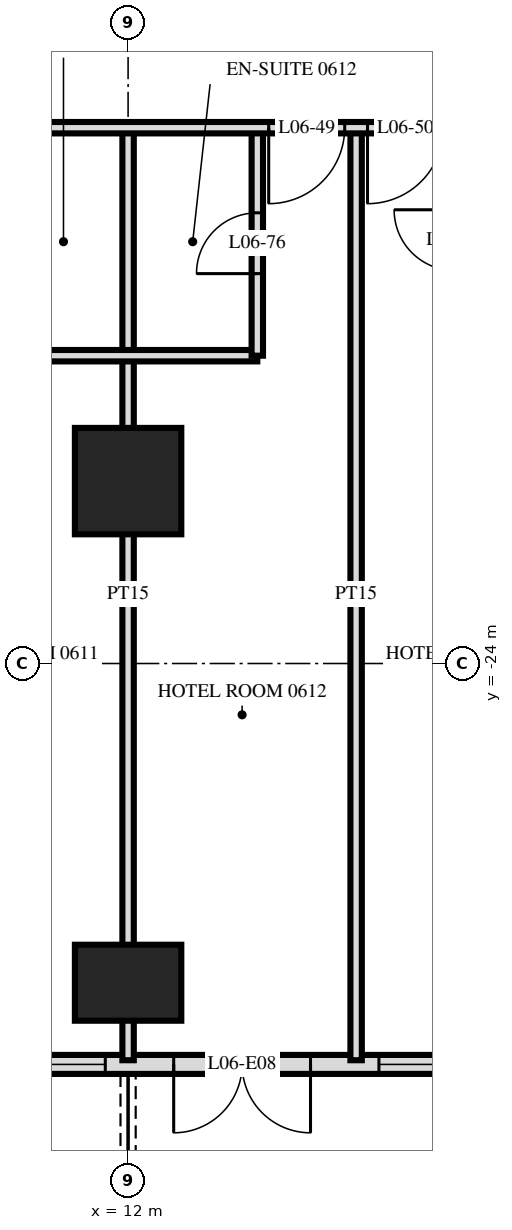
"""IFC4 building model, lengths in metres.
Left out: names, types, materials, properties, quantities, classifications, styles, units other than length and angle.
Written with IfcOpenShell. Run it as: python <this file> out.ifc"""

import sys

from ifc_helpers import new_model, si_unit, direction, frame, frame_2d, origin, origin_2d, place, context, subcontext, project, spatial, rectangle, extrude, element, fill, save


model = new_model("IFC4")
c1 = context("Model", 3, precision=1e-05, world=origin(), true_north=direction((0.0, 1.0)))
c2 = subcontext(c1, "Body", "Model", "MODEL_VIEW")
j1 = project(units=[si_unit("LENGTHUNIT", "METRE"), si_unit("PLANEANGLEUNIT", "RADIAN")], contexts=[c1])
p1 = place(None, origin())
s1 = spatial("IfcSite", under=j1, at=p1, CompositionType="ELEMENT")
p2 = place(p1, origin())
s2 = spatial("IfcBuilding", under=s1, at=p2, CompositionType="ELEMENT")
p3 = place(p2, frame((0.0, 0.0, 31.2)))
s3 = spatial("IfcBuildingStorey", under=s2, at=p3, CompositionType="ELEMENT", Elevation=31.2)
p4 = place(p3, frame((12.0, -28.2, 0.0), z_axis=(0.0, 0.0, 1.0), x_axis=(1.0, 0.0, 0.0)))
e1 = element("IfcColumn", 1, at=p4, inside=s3, PredefinedType="COLUMN", context=c2, shape_type="SweptSolid", body=[
    extrude(rectangle(XDim=1.4, YDim=1.0, at=origin_2d()), origin(), (0.0, 0.0, 1.0), 3.6),
])
p5 = place(p3, frame((12.0, -21.6, 0.0), z_axis=(0.0, 0.0, 1.0), x_axis=(1.0, 0.0, 0.0)))
e2 = element("IfcColumn", 2, at=p5, inside=s3, PredefinedType="COLUMN", context=c2, shape_type="SweptSolid", body=[
    extrude(rectangle(XDim=1.4, YDim=1.4, at=origin_2d()), origin(), (0.0, 0.0, 1.0), 3.6),
])
p6 = place(p3, frame((-28.775, -29.275, 0.0), z_axis=(0.0, 0.0, 1.0), x_axis=(1.0, 0.0, 0.0)))
e3 = element("IfcWall", 3, at=p6, inside=s3, PredefinedType="SOLIDWALL", context=c2, shape_type="SweptSolid", body=[
    extrude(rectangle(XDim=57.551, YDim=0.25, at=frame_2d((28.775, 0.0))), origin(), (0.0, 0.0, 1.0), 3.32),
])
p7 = place(p6, frame((0.575, 0.0, 0.0)))
e4 = element("IfcOpeningElement", 4, at=p7, cuts=e3, PredefinedType="OPENING", context=c2, shape_type="SweptSolid", body=[
    extrude(rectangle(XDim=1.8, YDim=2.4, at=frame_2d((0.9, 1.2))), frame((0.0, 0.135, 0.0), z_axis=(0.0, -1.0, 0.0), x_axis=(1.0, 0.0, 0.0)), (0.0, 0.0, 1.0), 0.27),
])
p8 = place(p6, frame((5.375, 0.0, 0.0)))
e5 = element("IfcOpeningElement", 5, at=p8, cuts=e3, PredefinedType="OPENING", context=c2, shape_type="SweptSolid", body=[
    extrude(rectangle(XDim=1.8, YDim=2.4, at=frame_2d((0.9, 1.2))), frame((0.0, 0.135, 0.0), z_axis=(0.0, -1.0, 0.0), x_axis=(1.0, 0.0, 0.0)), (0.0, 0.0, 1.0), 0.27),
])
p9 = place(p6, frame((8.075, 0.0, 0.3)))
e6 = element("IfcOpeningElement", 6, at=p9, cuts=e3, PredefinedType="OPENING", context=c2, shape_type="SweptSolid", body=[
    extrude(rectangle(XDim=2.4, YDim=2.1, at=frame_2d((1.2, 1.05))), frame((0.0, 0.135, 0.0), z_axis=(0.0, -1.0, 0.0), x_axis=(1.0, 0.0, 0.0)), (0.0, 0.0, 1.0), 0.27),
])
p10 = place(p6, frame((11.375, 0.0, 0.0)))
e7 = element("IfcOpeningElement", 7, at=p10, cuts=e3, PredefinedType="OPENING", context=c2, shape_type="SweptSolid", body=[
    extrude(rectangle(XDim=1.8, YDim=2.4, at=frame_2d((0.9, 1.2))), frame((0.0, 0.135, 0.0), z_axis=(0.0, -1.0, 0.0), x_axis=(1.0, 0.0, 0.0)), (0.0, 0.0, 1.0), 0.27),
])
p11 = place(p6, frame((14.075, 0.0, 0.3)))
e8 = element("IfcOpeningElement", 8, at=p11, cuts=e3, PredefinedType="OPENING", context=c2, shape_type="SweptSolid", body=[
    extrude(rectangle(XDim=2.4, YDim=2.1, at=frame_2d((1.2, 1.05))), frame((0.0, 0.135, 0.0), z_axis=(0.0, -1.0, 0.0), x_axis=(1.0, 0.0, 0.0)), (0.0, 0.0, 1.0), 0.27),
])
p12 = place(p6, frame((17.375, 0.0, 0.0)))
e9 = element("IfcOpeningElement", 9, at=p12, cuts=e3, PredefinedType="OPENING", context=c2, shape_type="SweptSolid", body=[
    extrude(rectangle(XDim=1.8, YDim=2.4, at=frame_2d((0.9, 1.2))), frame((0.0, 0.135, 0.0), z_axis=(0.0, -1.0, 0.0), x_axis=(1.0, 0.0, 0.0)), (0.0, 0.0, 1.0), 0.27),
])
p13 = place(p6, frame((20.075, 0.0, 0.3)))
e10 = element("IfcOpeningElement", 10, at=p13, cuts=e3, PredefinedType="OPENING", context=c2, shape_type="SweptSolid", body=[
    extrude(rectangle(XDim=2.4, YDim=2.1, at=frame_2d((1.2, 1.05))), frame((0.0, 0.135, 0.0), z_axis=(0.0, -1.0, 0.0), x_axis=(1.0, 0.0, 0.0)), (0.0, 0.0, 1.0), 0.27),
])
p14 = place(p6, frame((23.075, 0.0, 0.3)))
e11 = element("IfcOpeningElement", 11, at=p14, cuts=e3, PredefinedType="OPENING", context=c2, shape_type="SweptSolid", body=[
    extrude(rectangle(XDim=2.4, YDim=2.1, at=frame_2d((1.2, 1.05))), frame((0.0, 0.135, 0.0), z_axis=(0.0, -1.0, 0.0), x_axis=(1.0, 0.0, 0.0)), (0.0, 0.0, 1.0), 0.27),
])
p15 = place(p6, frame((26.375, 0.0, 0.0)))
e12 = element("IfcOpeningElement", 12, at=p15, cuts=e3, PredefinedType="OPENING", context=c2, shape_type="SweptSolid", body=[
    extrude(rectangle(XDim=1.8, YDim=2.4, at=frame_2d((0.9, 1.2))), frame((0.0, 0.135, 0.0), z_axis=(0.0, -1.0, 0.0), x_axis=(1.0, 0.0, 0.0)), (0.0, 0.0, 1.0), 0.27),
])
p16 = place(p6, frame((29.375, 0.0, 0.0)))
e13 = element("IfcOpeningElement", 13, at=p16, cuts=e3, PredefinedType="OPENING", context=c2, shape_type="SweptSolid", body=[
    extrude(rectangle(XDim=1.8, YDim=2.4, at=frame_2d((0.9, 1.2))), frame((0.0, 0.135, 0.0), z_axis=(0.0, -1.0, 0.0), x_axis=(1.0, 0.0, 0.0)), (0.0, 0.0, 1.0), 0.27),
])
p17 = place(p6, frame((32.075, 0.0, 0.3)))
e14 = element("IfcOpeningElement", 14, at=p17, cuts=e3, PredefinedType="OPENING", context=c2, shape_type="SweptSolid", body=[
    extrude(rectangle(XDim=2.4, YDim=2.1, at=frame_2d((1.2, 1.05))), frame((0.0, 0.135, 0.0), z_axis=(0.0, -1.0, 0.0), x_axis=(1.0, 0.0, 0.0)), (0.0, 0.0, 1.0), 0.27),
])
p18 = place(p6, frame((35.375, 0.0, 0.0)))
e15 = element("IfcOpeningElement", 15, at=p18, cuts=e3, PredefinedType="OPENING", context=c2, shape_type="SweptSolid", body=[
    extrude(rectangle(XDim=1.8, YDim=2.4, at=frame_2d((0.9, 1.2))), frame((0.0, 0.135, 0.0), z_axis=(0.0, -1.0, 0.0), x_axis=(1.0, 0.0, 0.0)), (0.0, 0.0, 1.0), 0.27),
])
p19 = place(p6, frame((38.075, 0.0, 0.3)))
e16 = element("IfcOpeningElement", 16, at=p19, cuts=e3, PredefinedType="OPENING", context=c2, shape_type="SweptSolid", body=[
    extrude(rectangle(XDim=2.4, YDim=2.1, at=frame_2d((1.2, 1.05))), frame((0.0, 0.135, 0.0), z_axis=(0.0, -1.0, 0.0), x_axis=(1.0, 0.0, 0.0)), (0.0, 0.0, 1.0), 0.27),
])
p20 = place(p6, frame((41.375, 0.0, 0.0)))
e17 = element("IfcOpeningElement", 17, at=p20, cuts=e3, PredefinedType="OPENING", context=c2, shape_type="SweptSolid", body=[
    extrude(rectangle(XDim=1.8, YDim=2.4, at=frame_2d((0.9, 1.2))), frame((0.0, 0.135, 0.0), z_axis=(0.0, -1.0, 0.0), x_axis=(1.0, 0.0, 0.0)), (0.0, 0.0, 1.0), 0.27),
])
p21 = place(p6, frame((44.075, 0.0, 0.3)))
e18 = element("IfcOpeningElement", 18, at=p21, cuts=e3, PredefinedType="OPENING", context=c2, shape_type="SweptSolid", body=[
    extrude(rectangle(XDim=2.4, YDim=2.1, at=frame_2d((1.2, 1.05))), frame((0.0, 0.135, 0.0), z_axis=(0.0, -1.0, 0.0), x_axis=(1.0, 0.0, 0.0)), (0.0, 0.0, 1.0), 0.27),
])
p22 = place(p6, frame((47.075, 0.0, 0.3)))
e19 = element("IfcOpeningElement", 19, at=p22, cuts=e3, PredefinedType="OPENING", context=c2, shape_type="SweptSolid", body=[
    extrude(rectangle(XDim=2.4, YDim=2.1, at=frame_2d((1.2, 1.05))), frame((0.0, 0.135, 0.0), z_axis=(0.0, -1.0, 0.0), x_axis=(1.0, 0.0, 0.0)), (0.0, 0.0, 1.0), 0.27),
])
p23 = place(p6, frame((50.375, 0.0, 0.0)))
e20 = element("IfcOpeningElement", 20, at=p23, cuts=e3, PredefinedType="OPENING", context=c2, shape_type="SweptSolid", body=[
    extrude(rectangle(XDim=1.8, YDim=2.4, at=frame_2d((0.9, 1.2))), frame((0.0, 0.135, 0.0), z_axis=(0.0, -1.0, 0.0), x_axis=(1.0, 0.0, 0.0)), (0.0, 0.0, 1.0), 0.27),
])
p24 = place(p6, frame((53.375, 0.0, 0.0)))
e21 = element("IfcOpeningElement", 21, at=p24, cuts=e3, PredefinedType="OPENING", context=c2, shape_type="SweptSolid", body=[
    extrude(rectangle(XDim=1.8, YDim=2.4, at=frame_2d((0.9, 1.2))), frame((0.0, 0.135, 0.0), z_axis=(0.0, -1.0, 0.0), x_axis=(1.0, 0.0, 0.0)), (0.0, 0.0, 1.0), 0.27),
])
p25 = place(p3, frame((15.0, -29.22, 0.0), z_axis=(0.0, 0.0, 1.0), x_axis=(0.0, 1.0, 0.0)))
e22 = element("IfcWall", 22, at=p25, inside=s3, PredefinedType="PARTITIONING", context=c2, shape_type="SweptSolid", body=[
    extrude(rectangle(XDim=12.27, YDim=0.15, at=frame_2d((6.135, 0.0))), origin(), (0.0, 0.0, 1.0), 3.32),
])
p26 = place(p3, frame((13.7, -19.95, 0.0), z_axis=(0.0, 0.0, 1.0), x_axis=(0.0, 1.0, 0.0)))
e23 = element("IfcWall", 23, at=p26, inside=s3, PredefinedType="PARTITIONING", context=c2, shape_type="SweptSolid", body=[
    extrude(rectangle(XDim=3.0, YDim=0.15, at=frame_2d((1.5, 0.0))), origin(), (0.0, 0.0, 1.0), 3.32),
])
p27 = place(p26, frame((1.08, 0.0, 0.0)))
e24 = element("IfcOpeningElement", 24, at=p27, cuts=e23, PredefinedType="OPENING", context=c2, shape_type="SweptSolid", body=[
    extrude(rectangle(XDim=0.8, YDim=2.1, at=frame_2d((0.4, 1.05))), frame((0.0, 0.085, 0.0), z_axis=(0.0, -1.0, 0.0), x_axis=(1.0, 0.0, 0.0)), (0.0, 0.0, 1.0), 0.17),
])
p28 = place(p3, frame((12.0, -29.22, 0.0), z_axis=(0.0, 0.0, 1.0), x_axis=(0.0, 1.0, 0.0)))
e25 = element("IfcWall", 25, at=p28, inside=s3, PredefinedType="PARTITIONING", context=c2, shape_type="SweptSolid", body=[
    extrude(rectangle(XDim=12.27, YDim=0.15, at=frame_2d((6.135, 0.0))), origin(), (0.0, 0.0, 1.0), 3.32),
])
p29 = place(p3, frame((10.3, -19.95, 0.0), z_axis=(0.0, 0.0, 1.0), x_axis=(1.0, 0.0, 0.0)))
e26 = element("IfcWall", 26, at=p29, inside=s3, PredefinedType="PARTITIONING", context=c2, shape_type="SweptSolid", body=[
    extrude(rectangle(XDim=3.4, YDim=0.15, at=frame_2d((1.7, 0.0))), origin(), (0.0, 0.0, 1.0), 3.32),
])
p30 = place(p3, frame((-33.12, -16.95, 0.0), z_axis=(0.0, 0.0, 1.0), x_axis=(1.0, 0.0, 0.0)))
e27 = element("IfcWall", 27, at=p30, inside=s3, PredefinedType="PARTITIONING", context=c2, shape_type="SweptSolid", body=[
    extrude(rectangle(XDim=66.24, YDim=0.15, at=frame_2d((33.12, 0.0))), origin(), (0.0, 0.0, 1.0), 3.32),
])
p31 = place(p30, frame((9.27, 0.0, 0.0)))
e28 = element("IfcOpeningElement", 28, at=p31, cuts=e27, PredefinedType="OPENING", context=c2, shape_type="SweptSolid", body=[
    extrude(rectangle(XDim=1.0, YDim=2.1, at=frame_2d((0.5, 1.05))), frame((0.0, 0.085, 0.0), z_axis=(0.0, -1.0, 0.0), x_axis=(1.0, 0.0, 0.0)), (0.0, 0.0, 1.0), 0.17),
])
p32 = place(p30, frame((13.97, 0.0, 0.0)))
e29 = element("IfcOpeningElement", 29, at=p32, cuts=e27, PredefinedType="OPENING", context=c2, shape_type="SweptSolid", body=[
    extrude(rectangle(XDim=1.0, YDim=2.1, at=frame_2d((0.5, 1.05))), frame((0.0, 0.085, 0.0), z_axis=(0.0, -1.0, 0.0), x_axis=(1.0, 0.0, 0.0)), (0.0, 0.0, 1.0), 0.17),
])
p33 = place(p30, frame((15.27, 0.0, 0.0)))
e30 = element("IfcOpeningElement", 30, at=p33, cuts=e27, PredefinedType="OPENING", context=c2, shape_type="SweptSolid", body=[
    extrude(rectangle(XDim=1.0, YDim=2.1, at=frame_2d((0.5, 1.05))), frame((0.0, 0.085, 0.0), z_axis=(0.0, -1.0, 0.0), x_axis=(1.0, 0.0, 0.0)), (0.0, 0.0, 1.0), 0.17),
])
p34 = place(p30, frame((19.97, 0.0, 0.0)))
e31 = element("IfcOpeningElement", 31, at=p34, cuts=e27, PredefinedType="OPENING", context=c2, shape_type="SweptSolid", body=[
    extrude(rectangle(XDim=1.0, YDim=2.1, at=frame_2d((0.5, 1.05))), frame((0.0, 0.085, 0.0), z_axis=(0.0, -1.0, 0.0), x_axis=(1.0, 0.0, 0.0)), (0.0, 0.0, 1.0), 0.17),
])
p35 = place(p30, frame((22.27, 0.0, 0.0)))
e32 = element("IfcOpeningElement", 32, at=p35, cuts=e27, PredefinedType="OPENING", context=c2, shape_type="SweptSolid", body=[
    extrude(rectangle(XDim=1.0, YDim=2.1, at=frame_2d((0.5, 1.05))), frame((0.0, 0.085, 0.0), z_axis=(0.0, -1.0, 0.0), x_axis=(1.0, 0.0, 0.0)), (0.0, 0.0, 1.0), 0.17),
])
p36 = place(p30, frame((28.97, 0.0, 0.0)))
e33 = element("IfcOpeningElement", 33, at=p36, cuts=e27, PredefinedType="OPENING", context=c2, shape_type="SweptSolid", body=[
    extrude(rectangle(XDim=1.0, YDim=2.1, at=frame_2d((0.5, 1.05))), frame((0.0, 0.085, 0.0), z_axis=(0.0, -1.0, 0.0), x_axis=(1.0, 0.0, 0.0)), (0.0, 0.0, 1.0), 0.17),
])
p37 = place(p30, frame((30.27, 0.0, 0.0)))
e34 = element("IfcOpeningElement", 34, at=p37, cuts=e27, PredefinedType="OPENING", context=c2, shape_type="SweptSolid", body=[
    extrude(rectangle(XDim=1.0, YDim=2.1, at=frame_2d((0.5, 1.05))), frame((0.0, 0.085, 0.0), z_axis=(0.0, -1.0, 0.0), x_axis=(1.0, 0.0, 0.0)), (0.0, 0.0, 1.0), 0.17),
])
p38 = place(p30, frame((34.97, 0.0, 0.0)))
e35 = element("IfcOpeningElement", 35, at=p38, cuts=e27, PredefinedType="OPENING", context=c2, shape_type="SweptSolid", body=[
    extrude(rectangle(XDim=1.0, YDim=2.1, at=frame_2d((0.5, 1.05))), frame((0.0, 0.085, 0.0), z_axis=(0.0, -1.0, 0.0), x_axis=(1.0, 0.0, 0.0)), (0.0, 0.0, 1.0), 0.17),
])
p39 = place(p30, frame((36.27, 0.0, 0.0)))
e36 = element("IfcOpeningElement", 36, at=p39, cuts=e27, PredefinedType="OPENING", context=c2, shape_type="SweptSolid", body=[
    extrude(rectangle(XDim=1.0, YDim=2.1, at=frame_2d((0.5, 1.05))), frame((0.0, 0.085, 0.0), z_axis=(0.0, -1.0, 0.0), x_axis=(1.0, 0.0, 0.0)), (0.0, 0.0, 1.0), 0.17),
])
p40 = place(p30, frame((40.97, 0.0, 0.0)))
e37 = element("IfcOpeningElement", 37, at=p40, cuts=e27, PredefinedType="OPENING", context=c2, shape_type="SweptSolid", body=[
    extrude(rectangle(XDim=1.0, YDim=2.1, at=frame_2d((0.5, 1.05))), frame((0.0, 0.085, 0.0), z_axis=(0.0, -1.0, 0.0), x_axis=(1.0, 0.0, 0.0)), (0.0, 0.0, 1.0), 0.17),
])
p41 = place(p30, frame((42.27, 0.0, 0.0)))
e38 = element("IfcOpeningElement", 38, at=p41, cuts=e27, PredefinedType="OPENING", context=c2, shape_type="SweptSolid", body=[
    extrude(rectangle(XDim=1.0, YDim=2.1, at=frame_2d((0.5, 1.05))), frame((0.0, 0.085, 0.0), z_axis=(0.0, -1.0, 0.0), x_axis=(1.0, 0.0, 0.0)), (0.0, 0.0, 1.0), 0.17),
])
p42 = place(p30, frame((46.97, 0.0, 0.0)))
e39 = element("IfcOpeningElement", 39, at=p42, cuts=e27, PredefinedType="OPENING", context=c2, shape_type="SweptSolid", body=[
    extrude(rectangle(XDim=1.0, YDim=2.1, at=frame_2d((0.5, 1.05))), frame((0.0, 0.085, 0.0), z_axis=(0.0, -1.0, 0.0), x_axis=(1.0, 0.0, 0.0)), (0.0, 0.0, 1.0), 0.17),
])
p43 = place(p30, frame((48.27, 0.0, 0.0)))
e40 = element("IfcOpeningElement", 40, at=p43, cuts=e27, PredefinedType="OPENING", context=c2, shape_type="SweptSolid", body=[
    extrude(rectangle(XDim=1.0, YDim=2.1, at=frame_2d((0.5, 1.05))), frame((0.0, 0.085, 0.0), z_axis=(0.0, -1.0, 0.0), x_axis=(1.0, 0.0, 0.0)), (0.0, 0.0, 1.0), 0.17),
])
p44 = place(p30, frame((52.97, 0.0, 0.0)))
e41 = element("IfcOpeningElement", 41, at=p44, cuts=e27, PredefinedType="OPENING", context=c2, shape_type="SweptSolid", body=[
    extrude(rectangle(XDim=1.0, YDim=2.1, at=frame_2d((0.5, 1.05))), frame((0.0, 0.085, 0.0), z_axis=(0.0, -1.0, 0.0), x_axis=(1.0, 0.0, 0.0)), (0.0, 0.0, 1.0), 0.17),
])
p45 = place(p30, frame((54.27, 0.0, 0.0)))
e42 = element("IfcOpeningElement", 42, at=p45, cuts=e27, PredefinedType="OPENING", context=c2, shape_type="SweptSolid", body=[
    extrude(rectangle(XDim=1.0, YDim=2.1, at=frame_2d((0.5, 1.05))), frame((0.0, 0.085, 0.0), z_axis=(0.0, -1.0, 0.0), x_axis=(1.0, 0.0, 0.0)), (0.0, 0.0, 1.0), 0.17),
])
p46 = place(p30, frame((4.4, 0.0, 0.0)))
e43 = element("IfcOpeningElement", 43, at=p46, cuts=e27, PredefinedType="OPENING", context=c2, shape_type="SweptSolid", body=[
    extrude(rectangle(XDim=1.0, YDim=2.1, at=frame_2d((0.5, 1.05))), frame((0.0, 0.085, 0.0), z_axis=(0.0, -1.0, 0.0), x_axis=(1.0, 0.0, 0.0)), (0.0, 0.0, 1.0), 0.17),
])
p47 = place(p30, frame((60.8, 0.0, 0.0)))
e44 = element("IfcOpeningElement", 44, at=p47, cuts=e27, PredefinedType="OPENING", context=c2, shape_type="SweptSolid", body=[
    extrude(rectangle(XDim=1.0, YDim=2.1, at=frame_2d((0.5, 1.05))), frame((0.0, 0.085, 0.0), z_axis=(0.0, -1.0, 0.0), x_axis=(1.0, 0.0, 0.0)), (0.0, 0.0, 1.0), 0.17),
])
p48 = place(p19, origin())
e45 = element("IfcWindow", 45, at=p48, inside=s3, PartitioningType="SINGLE_PANEL", PredefinedType="WINDOW", context=c2, shape_type="SweptSolid", body=[
    extrude(rectangle(XDim=2.4, YDim=2.1, at=frame_2d((1.2, 1.05))), frame((0.0, 0.03, 0.0), z_axis=(0.0, -1.0, 0.0), x_axis=(1.0, 0.0, 0.0)), (0.0, 0.0, 1.0), 0.06),
])
fill(e16, e45)
p49 = place(p20, frame((0.9, 0.0, 0.0), z_axis=(0.0, 0.0, 1.0), x_axis=(-1.0, 0.0, 0.0)))
e46 = element("IfcDoor", 46, at=p49, inside=s3, OperationType="DOUBLE_DOOR_SINGLE_SWING", PredefinedType="DOOR", context=c2, shape_type="SweptSolid", body=[
    extrude(rectangle(XDim=1.8, YDim=2.4, at=frame_2d((0.0, 1.2))), frame((0.0, -0.025, 0.0), z_axis=(0.0, 1.0, 0.0), x_axis=(-1.0, 0.0, 0.0)), (0.0, 0.0, 1.0), 0.05),
])
fill(e17, e46)
p50 = place(p21, origin())
e47 = element("IfcWindow", 47, at=p50, inside=s3, PartitioningType="SINGLE_PANEL", PredefinedType="WINDOW", context=c2, shape_type="SweptSolid", body=[
    extrude(rectangle(XDim=2.4, YDim=2.1, at=frame_2d((1.2, 1.05))), frame((0.0, 0.03, 0.0), z_axis=(0.0, -1.0, 0.0), x_axis=(1.0, 0.0, 0.0)), (0.0, 0.0, 1.0), 0.06),
])
fill(e18, e47)
p51 = place(p42, frame((0.5, 0.0, 0.0), z_axis=(0.0, 0.0, 1.0), x_axis=(-1.0, 0.0, 0.0)))
e48 = element("IfcDoor", 48, at=p51, inside=s3, OperationType="SINGLE_SWING_LEFT", PredefinedType="DOOR", context=c2, shape_type="SweptSolid", body=[
    extrude(rectangle(XDim=1.0, YDim=2.1, at=frame_2d((0.0, 1.05))), frame((0.0, -0.025, 0.0), z_axis=(0.0, 1.0, 0.0), x_axis=(-1.0, 0.0, 0.0)), (0.0, 0.0, 1.0), 0.05),
])
fill(e39, e48)
p52 = place(p43, frame((0.5, 0.0, 0.0), z_axis=(0.0, 0.0, 1.0), x_axis=(-1.0, 0.0, 0.0)))
e49 = element("IfcDoor", 49, at=p52, inside=s3, OperationType="SINGLE_SWING_LEFT", PredefinedType="DOOR", context=c2, shape_type="SweptSolid", body=[
    extrude(rectangle(XDim=1.0, YDim=2.1, at=frame_2d((0.0, 1.05))), frame((0.0, -0.025, 0.0), z_axis=(0.0, 1.0, 0.0), x_axis=(-1.0, 0.0, 0.0)), (0.0, 0.0, 1.0), 0.05),
])
fill(e40, e49)
p53 = place(p27, origin())
e50 = element("IfcDoor", 50, at=p53, inside=s3, OperationType="SINGLE_SWING_RIGHT", PredefinedType="DOOR", context=c2, shape_type="SweptSolid", body=[
    extrude(rectangle(XDim=0.8, YDim=2.1, at=frame_2d((0.4, 1.05))), frame((0.0, 0.025, 0.0), z_axis=(0.0, -1.0, 0.0), x_axis=(1.0, 0.0, 0.0)), (0.0, 0.0, 1.0), 0.05),
])
fill(e24, e50)
save(model, sys.argv[1])
